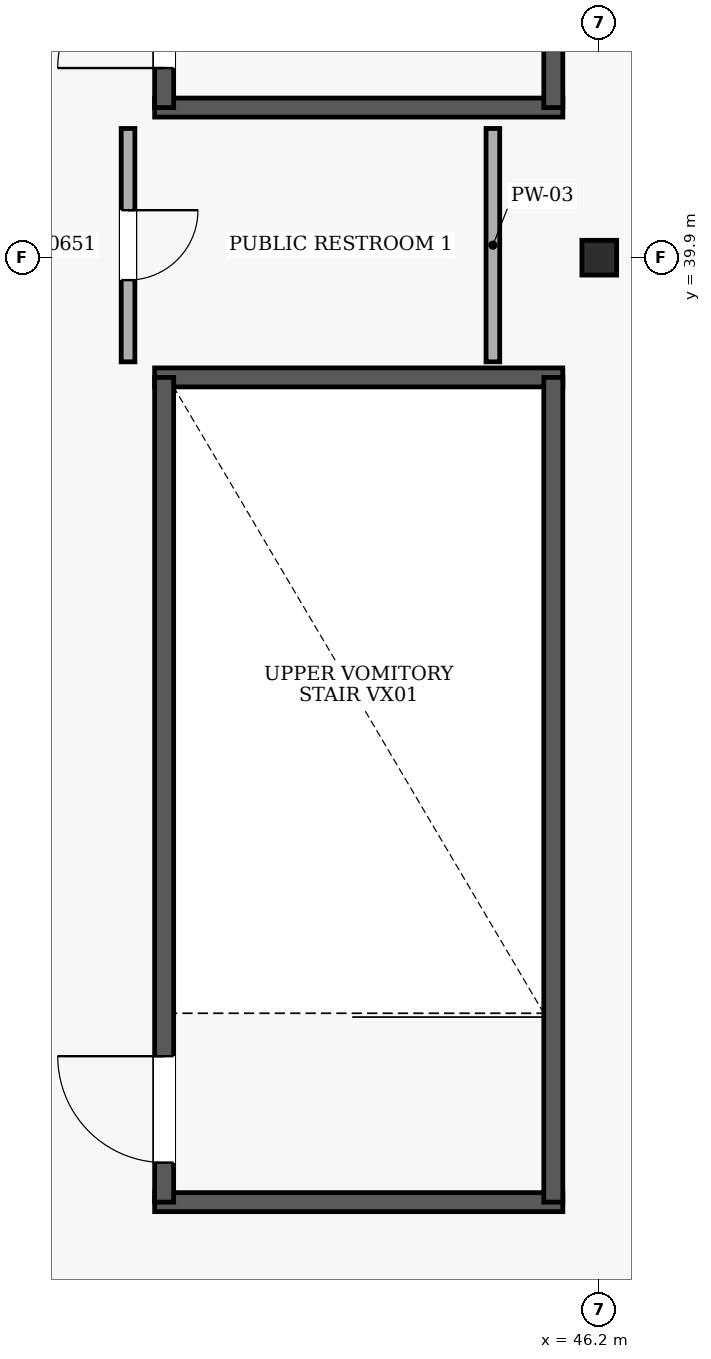
"""IFC4 building model, lengths in metres.
Left out: names, types, materials, properties, quantities, classifications, styles, units other than length and angle.
Written with IfcOpenShell. Run it as: python <this file> out.ifc"""

import sys

from ifc_helpers import new_model, si_unit, direction, frame, frame_2d, origin, origin_2d, place, context, subcontext, project, spatial, rectangle, hollow_circle, extrude, element, fill, save


model = new_model("IFC4")
c1 = context("Model", 3, precision=1e-05, world=origin(), true_north=direction((0.0, 1.0)))
c2 = subcontext(c1, "Body", "Model", "MODEL_VIEW")
j1 = project(units=[si_unit("LENGTHUNIT", "METRE"), si_unit("PLANEANGLEUNIT", "RADIAN")], contexts=[c1])
p1 = place(None, origin())
s1 = spatial("IfcSite", under=j1, at=p1, CompositionType="ELEMENT")
p2 = place(p1, origin())
s2 = spatial("IfcBuilding", under=s1, at=p2, CompositionType="ELEMENT")
p3 = place(p2, frame((0.0, 0.0, 15.0)))
s3 = spatial("IfcBuildingStorey", under=s2, at=p3, CompositionType="ELEMENT", Elevation=15.0)
p4 = place(p3, frame((46.2, 39.9, 0.0), z_axis=(0.0, 0.0, 1.0), x_axis=(1.0, 0.0, 0.0)))
e1 = element("IfcColumn", 1, at=p4, inside=s3, PredefinedType="COLUMN", context=c2, shape_type="SweptSolid", body=[
    extrude(hollow_circle(Radius=0.229, WallThickness=0.02, at=origin_2d()), origin(), (0.0, 0.0, 1.0), 4.8),
])
for number, where, z_axis, x_axis in (
    (2, (40.35, 27.475, 0.0), (0.0, 0.0, 1.0), (1.0, 0.0, 0.0)),
    (3, (45.72, 38.325, 0.0), (0.0, 0.0, 1.0), (-1.0, 0.0, 0.0)),
):
    element("IfcWall", number, at=place(p3, frame(where, z_axis=z_axis, x_axis=x_axis)), inside=s3, PredefinedType="SHEAR", context=c2, shape_type="SweptSolid", body=[
        extrude(rectangle(XDim=5.37, YDim=0.25, at=frame_2d((2.685, 0.0))), origin(), (0.0, 0.0, 1.0), 4.5),
    ])
p5 = place(p3, frame((40.475, 27.475, 0.0), z_axis=(0.0, 0.0, 1.0), x_axis=(0.0, 1.0, 0.0)))
e4 = element("IfcWall", 4, at=p5, inside=s3, PredefinedType="SHEAR", context=c2, shape_type="SweptSolid", body=[
    extrude(rectangle(XDim=10.85, YDim=0.25, at=frame_2d((5.425, 0.0))), origin(), (0.0, 0.0, 1.0), 4.5),
])
p6 = place(p5, frame((0.52, 0.0, 0.0)))
e5 = element("IfcOpeningElement", 5, at=p6, cuts=e4, PredefinedType="OPENING", context=c2, shape_type="SweptSolid", body=[
    extrude(rectangle(XDim=1.4, YDim=2.15, at=frame_2d((0.7, 1.075))), frame((0.0, 0.135, 0.0), z_axis=(0.0, -1.0, 0.0), x_axis=(1.0, 0.0, 0.0)), (0.0, 0.0, 1.0), 0.27),
])
p7 = place(p3, frame((45.595, 27.475, 0.0), z_axis=(0.0, 0.0, 1.0), x_axis=(0.0, 1.0, 0.0)))
e6 = element("IfcWall", 6, at=p7, inside=s3, PredefinedType="SHEAR", context=c2, shape_type="SweptSolid", body=[
    extrude(rectangle(XDim=10.85, YDim=0.25, at=frame_2d((5.425, 0.0))), origin(), (0.0, 0.0, 1.0), 4.5),
])
p8 = place(p3, frame((40.35, 41.875, 0.0), z_axis=(0.0, 0.0, 1.0), x_axis=(1.0, 0.0, 0.0)))
e7 = element("IfcWall", 7, at=p8, inside=s3, PredefinedType="SHEAR", context=c2, shape_type="SweptSolid", body=[
    extrude(rectangle(XDim=5.37, YDim=0.25, at=frame_2d((2.685, 0.0))), origin(), (0.0, 0.0, 1.0), 4.5),
])
p9 = place(p3, frame((40.475, 41.875, 0.0), z_axis=(0.0, 0.0, 1.0), x_axis=(0.0, 1.0, 0.0)))
e8 = element("IfcWall", 8, at=p9, inside=s3, PredefinedType="SHEAR", context=c2, shape_type="SweptSolid", body=[
    extrude(rectangle(XDim=10.85, YDim=0.25, at=frame_2d((5.425, 0.0))), origin(), (0.0, 0.0, 1.0), 4.5),
])
p10 = place(p9, frame((0.52, 0.0, 0.0)))
e9 = element("IfcOpeningElement", 9, at=p10, cuts=e8, PredefinedType="OPENING", context=c2, shape_type="SweptSolid", body=[
    extrude(rectangle(XDim=1.4, YDim=2.15, at=frame_2d((0.7, 1.075))), frame((0.0, 0.135, 0.0), z_axis=(0.0, -1.0, 0.0), x_axis=(1.0, 0.0, 0.0)), (0.0, 0.0, 1.0), 0.27),
])
p11 = place(p3, frame((45.595, 41.875, 0.0), z_axis=(0.0, 0.0, 1.0), x_axis=(0.0, 1.0, 0.0)))
e10 = element("IfcWall", 10, at=p11, inside=s3, PredefinedType="SHEAR", context=c2, shape_type="SweptSolid", body=[
    extrude(rectangle(XDim=10.85, YDim=0.25, at=frame_2d((5.425, 0.0))), origin(), (0.0, 0.0, 1.0), 4.5),
])
p12 = place(p3, frame((44.8, 38.53, 0.0), z_axis=(0.0, 0.0, 1.0), x_axis=(0.0, 1.0, 0.0)))
e11 = element("IfcWall", 11, at=p12, inside=s3, PredefinedType="PARTITIONING", context=c2, shape_type="SweptSolid", body=[
    extrude(rectangle(XDim=3.07, YDim=0.18, at=frame_2d((1.535, 0.0))), origin(), (0.0, 0.0, 1.0), 4.5),
])
p13 = place(p3, frame((40.0, 41.6, 0.0), z_axis=(0.0, 0.0, 1.0), x_axis=(0.0, -1.0, 0.0)))
e12 = element("IfcWall", 12, at=p13, inside=s3, PredefinedType="PARTITIONING", context=c2, shape_type="SweptSolid", body=[
    extrude(rectangle(XDim=3.07, YDim=0.18, at=frame_2d((1.535, 0.0))), origin(), (0.0, 0.0, 1.0), 4.5),
])
p14 = place(p13, frame((1.075, 0.0, 0.0)))
e13 = element("IfcOpeningElement", 13, at=p14, cuts=e12, PredefinedType="OPENING", context=c2, shape_type="SweptSolid", body=[
    extrude(rectangle(XDim=0.92, YDim=2.1, at=frame_2d((0.46, 1.05))), frame((0.0, 0.1, 0.0), z_axis=(0.0, -1.0, 0.0), x_axis=(1.0, 0.0, 0.0)), (0.0, 0.0, 1.0), 0.2),
])
p15 = place(p6, frame((1.4, 0.0, 0.0), z_axis=(0.0, 0.0, 1.0), x_axis=(-1.0, 0.0, 0.0)))
e14 = element("IfcDoor", 14, at=p15, inside=s3, OperationType="SINGLE_SWING_LEFT", PredefinedType="DOOR", context=c2, shape_type="SweptSolid", body=[
    extrude(rectangle(XDim=1.4, YDim=2.15, at=frame_2d((0.7, 1.075))), frame((0.0, 0.025, 0.0), z_axis=(0.0, -1.0, 0.0), x_axis=(1.0, 0.0, 0.0)), (0.0, 0.0, 1.0), 0.05),
])
fill(e5, e14)
p16 = place(p10, frame((1.4, 0.0, 0.0), z_axis=(0.0, 0.0, 1.0), x_axis=(-1.0, 0.0, 0.0)))
e15 = element("IfcDoor", 15, at=p16, inside=s3, OperationType="SINGLE_SWING_RIGHT", PredefinedType="DOOR", context=c2, shape_type="SweptSolid", body=[
    extrude(rectangle(XDim=1.4, YDim=2.15, at=frame_2d((0.7, 1.075))), frame((0.0, 0.025, 0.0), z_axis=(0.0, -1.0, 0.0), x_axis=(1.0, 0.0, 0.0)), (0.0, 0.0, 1.0), 0.05),
])
fill(e9, e15)
p17 = place(p14, origin())
e16 = element("IfcDoor", 16, at=p17, inside=s3, OperationType="SINGLE_SWING_LEFT", PredefinedType="DOOR", context=c2, shape_type="SweptSolid", body=[
    extrude(rectangle(XDim=0.92, YDim=2.1, at=frame_2d((0.46, 1.05))), frame((0.0, 0.025, 0.0), z_axis=(0.0, -1.0, 0.0), x_axis=(1.0, 0.0, 0.0)), (0.0, 0.0, 1.0), 0.05),
])
fill(e13, e16)
save(model, sys.argv[1])
